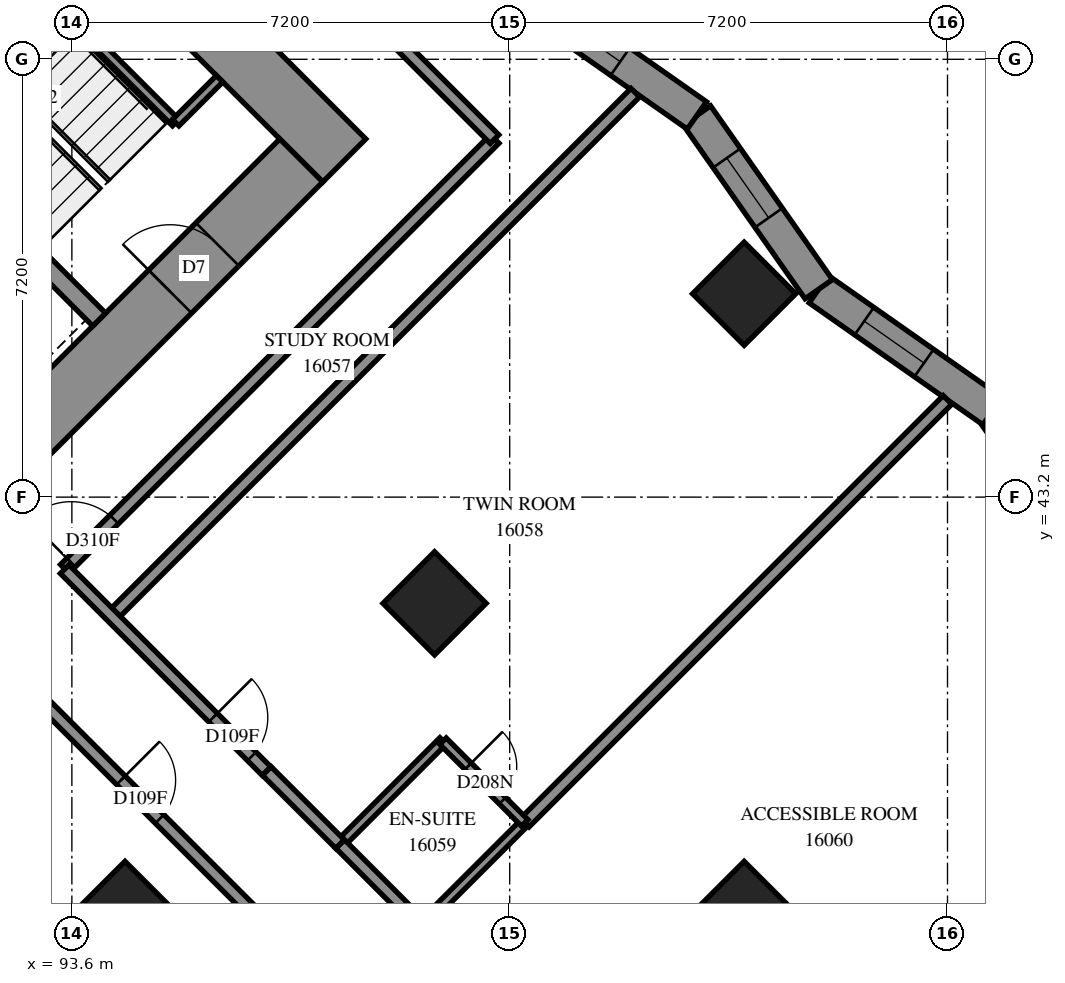
"""IFC4 building model, lengths in metres.
Left out: names, types, materials, properties, quantities, classifications, styles, units other than length and angle.
Written with IfcOpenShell. Run it as: python <this file> out.ifc"""

import sys

from ifc_helpers import new_model, si_unit, direction, frame, frame_2d, origin, origin_2d, place, context, subcontext, project, spatial, polyline, rectangle, outline, extrude, element, fill, save


model = new_model("IFC4")
c1 = context("Model", 3, precision=1e-05, world=origin(), true_north=direction((0.0, 1.0)))
c2 = subcontext(c1, "Body", "Model", "MODEL_VIEW")
j1 = project(units=[si_unit("LENGTHUNIT", "METRE"), si_unit("PLANEANGLEUNIT", "RADIAN")], contexts=[c1])
p1 = place(None, origin())
s1 = spatial("IfcSite", under=j1, at=p1, CompositionType="ELEMENT")
p2 = place(p1, origin())
s2 = spatial("IfcBuilding", under=s1, at=p2, CompositionType="ELEMENT")
p3 = place(p2, frame((0.0, 0.0, 61.0)))
s3 = spatial("IfcBuildingStorey", under=s2, at=p3, CompositionType="ELEMENT", Elevation=61.0)
for number, where, z_axis, x_axis in (
    (1, (104.656, 46.544, 0.0), (0.0, 0.0, 1.0), (0.707, -0.707, 0.0)),
    (2, (99.565, 41.453, 0.0), (0.0, 0.0, 1.0), (0.707, -0.707, 0.0)),
    (3, (94.474, 36.362, 0.0), (0.0, 0.0, 1.0), (0.707, -0.707, 0.0)),
    (4, (104.656, 36.362, 0.0), (0.0, 0.0, 1.0), (0.707, -0.707, 0.0)),
):
    element("IfcColumn", number, at=place(p3, frame(where, z_axis=z_axis, x_axis=x_axis)), inside=s3, PredefinedType="COLUMN", context=c2, shape_type="SweptSolid", body=[
        extrude(rectangle(XDim=1.2, YDim=1.2, at=origin_2d()), origin(), (0.0, 0.0, 1.0), 3.1),
    ])
p4 = place(p3, frame((86.483, 60.333, -0.3), z_axis=(0.0, 0.0, 1.0), x_axis=(0.70710983, -0.7071037324, 0.0)))
e5 = element("IfcWall", 5, at=p4, inside=s3, PredefinedType="SHEAR", context=c2, shape_type="SweptSolid", body=[
    extrude(rectangle(XDim=16.4, YDim=1.0, at=frame_2d((8.2, 0.0))), origin(), (0.0, 0.0, 1.0), 2.7),
])
p5 = place(p4, frame((11.0, 0.0, 0.3)))
e6 = element("IfcOpeningElement", 6, at=p5, cuts=e5, PredefinedType="OPENING", context=c2, shape_type="SweptSolid", body=[
    extrude(rectangle(XDim=0.8, YDim=2.1, at=frame_2d((0.4, 1.05))), frame((0.0, 0.51, 0.0), z_axis=(0.0, -1.0, 0.0), x_axis=(1.0, 0.0, 0.0)), (0.0, 0.0, 1.0), 1.02),
])
p6 = place(p3, frame((87.19, 38.554, -0.3), z_axis=(0.0, 0.0, 1.0), x_axis=(0.707103309, 0.7071102534, 0.0)))
e7 = element("IfcWall", 7, at=p6, inside=s3, PredefinedType="SHEAR", context=c2, shape_type="SweptSolid", body=[
    extrude(rectangle(XDim=14.4, YDim=1.0, at=frame_2d((7.2, 0.0))), origin(), (0.0, 0.0, 1.0), 2.7),
])
p7 = place(p6, frame((4.55, 0.0, 0.3)))
e8 = element("IfcOpeningElement", 8, at=p7, cuts=e7, PredefinedType="OPENING", context=c2, shape_type="SweptSolid", body=[
    extrude(rectangle(XDim=1.1, YDim=2.1, at=frame_2d((0.55, 1.05))), frame((0.0, 0.51, 0.0), z_axis=(0.0, -1.0, 0.0), x_axis=(1.0, 0.0, 0.0)), (0.0, 0.0, 1.0), 1.02),
])
p8 = place(p6, frame((11.35, 0.0, 0.3)))
e9 = element("IfcOpeningElement", 9, at=p8, cuts=e7, PredefinedType="OPENING", context=c2, shape_type="SweptSolid", body=[
    extrude(rectangle(XDim=1.1, YDim=2.1, at=frame_2d((0.55, 1.05))), frame((0.0, 0.51, 0.0), z_axis=(0.0, -1.0, 0.0), x_axis=(1.0, 0.0, 0.0)), (0.0, 0.0, 1.0), 1.02),
])
p9 = place(p3, frame((88.958, 51.211, 0.0), z_axis=(0.0, 0.0, 1.0), x_axis=(0.7070998367, -0.7071137256, 0.0)))
e10 = element("IfcWall", 10, at=p9, inside=s3, PredefinedType="SOLIDWALL", context=c2, shape_type="SweptSolid", body=[
    extrude(rectangle(XDim=7.2, YDim=0.3, at=frame_2d((3.6, 0.0))), origin(), (0.0, 0.0, 1.0), 3.1),
])
p10 = place(p3, frame((110.743, 41.759, 0.0), z_axis=(0.0, 0.0, 1.0), x_axis=(-0.5742832552, 0.8186566697, 0.0)))
e11 = element("IfcWall", 11, at=p10, inside=s3, PredefinedType="SOLIDWALL", context=c2, shape_type="SweptSolid", body=[
    extrude(outline(polyline([(0.048, -0.275), (3.538, -0.275), (3.442, 0.275), (-0.048, 0.275), (0.048, -0.275)])), origin(), (0.0, 0.0, 1.0), 3.1),
])
p11 = place(p10, frame((1.269, 0.0, 0.5)))
e12 = element("IfcOpeningElement", 12, at=p11, cuts=e11, PredefinedType="OPENING", context=c2, shape_type="SweptSolid", body=[
    extrude(rectangle(XDim=1.2, YDim=2.45, at=frame_2d((0.6, 1.225))), frame((0.0, 0.285, 0.0), z_axis=(0.0, -1.0, 0.0), x_axis=(1.0, 0.0, 0.0)), (0.0, 0.0, 1.0), 0.57),
])
p12 = place(p3, frame((108.739, 44.616, 0.0), z_axis=(0.0, 0.0, 1.0), x_axis=(-0.8186701418, 0.5742640499, 0.0)))
e13 = element("IfcWall", 13, at=p12, inside=s3, PredefinedType="SOLIDWALL", context=c2, shape_type="SweptSolid", body=[
    extrude(outline(polyline([(-0.048, -0.275), (3.442, -0.275), (3.538, 0.275), (0.048, 0.275), (-0.048, -0.275)])), origin(), (0.0, 0.0, 1.0), 3.1),
])
p13 = place(p12, frame((1.375, 0.0, 0.5)))
e14 = element("IfcOpeningElement", 14, at=p13, cuts=e13, PredefinedType="OPENING", context=c2, shape_type="SweptSolid", body=[
    extrude(rectangle(XDim=1.2, YDim=2.45, at=frame_2d((0.6, 1.225))), frame((0.0, 0.285, 0.0), z_axis=(0.0, -1.0, 0.0), x_axis=(1.0, 0.0, 0.0)), (0.0, 0.0, 1.0), 0.57),
])
p14 = place(p3, frame((105.882, 46.62, 0.0), z_axis=(0.0, 0.0, 1.0), x_axis=(-0.5742832552, 0.8186566697, 0.0)))
e15 = element("IfcWall", 15, at=p14, inside=s3, PredefinedType="SOLIDWALL", context=c2, shape_type="SweptSolid", body=[
    extrude(outline(polyline([(0.048, -0.275), (3.538, -0.275), (3.442, 0.275), (-0.048, 0.275), (0.048, -0.275)])), origin(), (0.0, 0.0, 1.0), 3.1),
])
p15 = place(p14, frame((1.434, 0.0, 0.5)))
e16 = element("IfcOpeningElement", 16, at=p15, cuts=e15, PredefinedType="OPENING", context=c2, shape_type="SweptSolid", body=[
    extrude(rectangle(XDim=1.2, YDim=2.45, at=frame_2d((0.6, 1.225))), frame((0.0, 0.285, 0.0), z_axis=(0.0, -1.0, 0.0), x_axis=(1.0, 0.0, 0.0)), (0.0, 0.0, 1.0), 0.57),
])
p16 = place(p3, frame((103.878, 49.477, 0.0), z_axis=(0.0, 0.0, 1.0), x_axis=(-0.8186472188, 0.5742967275, 0.0)))
e17 = element("IfcWall", 17, at=p16, inside=s3, PredefinedType="SOLIDWALL", context=c2, shape_type="SweptSolid", body=[
    extrude(outline(polyline([(-0.048, -0.275), (3.442, -0.275), (3.538, 0.275), (0.048, 0.275), (-0.048, -0.275)])), origin(), (0.0, 0.0, 1.0), 3.1),
])
p17 = place(p16, frame((1.541, 0.0, 0.5)))
e18 = element("IfcOpeningElement", 18, at=p17, cuts=e17, PredefinedType="OPENING", context=c2, shape_type="SweptSolid", body=[
    extrude(rectangle(XDim=1.2, YDim=2.45, at=frame_2d((0.6, 1.225))), frame((0.0, 0.285, 0.0), z_axis=(0.0, -1.0, 0.0), x_axis=(1.0, 0.0, 0.0)), (0.0, 0.0, 1.0), 0.57),
])
p18 = place(p3, frame((91.313, 53.354, 0.0), z_axis=(0.0, 0.0, 1.0), x_axis=(0.7071067812, -0.7071067812, 0.0)))
e19 = element("IfcWall", 19, at=p18, inside=s3, PredefinedType="PARTITIONING", context=c2, shape_type="SweptSolid", body=[
    extrude(rectangle(XDim=5.65, YDim=0.15, at=frame_2d((2.825, 0.0))), origin(), (0.0, 0.0, 1.0), 3.1),
])
p19 = place(p3, frame((95.308, 49.358, 0.0), z_axis=(0.0, 0.0, 1.0), x_axis=(0.70705776, 0.707155799, 0.0)))
e20 = element("IfcWall", 20, at=p19, inside=s3, PredefinedType="PARTITIONING", context=c2, shape_type="SweptSolid", body=[
    extrude(rectangle(XDim=1.02, YDim=0.15, at=frame_2d((0.51, 0.0))), origin(), (0.0, 0.0, 1.0), 3.1),
])
p20 = place(p3, frame((94.259, 41.243, 0.0), z_axis=(0.0, 0.0, 1.0), x_axis=(0.7070205168, 0.707193035, 0.0)))
e21 = element("IfcWall", 21, at=p20, inside=s3, PredefinedType="PARTITIONING", context=c2, shape_type="SweptSolid", body=[
    extrude(rectangle(XDim=12.173, YDim=0.2, at=frame_2d((6.086, 0.0))), origin(), (0.0, 0.0, 1.0), 3.1),
])
p21 = place(p3, frame((93.484, 42.02, 0.0), z_axis=(0.0, 0.0, 1.0), x_axis=(0.7071067812, 0.7071067812, 0.0)))
e22 = element("IfcWall", 22, at=p21, inside=s3, PredefinedType="PARTITIONING", context=c2, shape_type="SweptSolid", body=[
    extrude(rectangle(XDim=9.998, YDim=0.2, at=frame_2d((4.999, 0.0))), origin(), (0.0, 0.0, 1.0), 3.1),
])
p22 = place(p21, frame((0.148, 0.0, 0.0)))
e23 = element("IfcOpeningElement", 23, at=p22, cuts=e22, PredefinedType="OPENING", context=c2, shape_type="SweptSolid", body=[
    extrude(rectangle(XDim=1.0, YDim=2.1, at=frame_2d((0.5, 1.05))), frame((0.0, 0.11, 0.0), z_axis=(0.0, -1.0, 0.0), x_axis=(1.0, 0.0, 0.0)), (0.0, 0.0, 1.0), 0.22),
])
p23 = place(p3, frame((106.14, 32.756, 0.0), z_axis=(0.0, 0.0, 1.0), x_axis=(0.7071017243, 0.707111838, 0.0)))
e24 = element("IfcWall", 24, at=p23, inside=s3, PredefinedType="PARTITIONING", context=c2, shape_type="SweptSolid", body=[
    extrude(rectangle(XDim=9.887, YDim=0.2, at=frame_2d((4.944, 0.0))), origin(), (0.0, 0.0, 1.0), 3.1),
])
p24 = place(p3, frame((101.049, 37.847, 0.0), z_axis=(0.0, 0.0, 1.0), x_axis=(0.7071067812, 0.7071067812, 0.0)))
e25 = element("IfcWall", 25, at=p24, inside=s3, PredefinedType="PARTITIONING", context=c2, shape_type="SweptSolid", body=[
    extrude(rectangle(XDim=9.831, YDim=0.2, at=frame_2d((4.915, 0.0))), origin(), (0.0, 0.0, 1.0), 3.1),
])
p25 = place(p3, frame((92.349, 40.601, 0.0), z_axis=(0.0, 0.0, 1.0), x_axis=(0.7071067812, -0.7071067812, 0.0)))
e26 = element("IfcWall", 26, at=p25, inside=s3, PredefinedType="PARTITIONING", context=c2, shape_type="SweptSolid", body=[
    extrude(rectangle(XDim=8.101, YDim=0.2, at=frame_2d((4.05, 0.0))), origin(), (0.0, 0.0, 1.0), 3.1),
])
p26 = place(p25, frame((2.909, 0.0, 0.0)))
e27 = element("IfcOpeningElement", 27, at=p26, cuts=e26, PredefinedType="OPENING", context=c2, shape_type="SweptSolid", body=[
    extrude(rectangle(XDim=0.9, YDim=2.1, at=frame_2d((0.45, 1.05))), frame((0.0, 0.11, 0.0), z_axis=(0.0, -1.0, 0.0), x_axis=(1.0, 0.0, 0.0)), (0.0, 0.0, 1.0), 0.22),
])
p27 = place(p3, frame((93.481, 42.015, 0.0), z_axis=(0.0, 0.0, 1.0), x_axis=(0.7071067812, -0.7071067812, 0.0)))
e28 = element("IfcWall", 28, at=p27, inside=s3, PredefinedType="PARTITIONING", context=c2, shape_type="SweptSolid", body=[
    extrude(rectangle(XDim=4.698, YDim=0.2, at=frame_2d((2.349, 0.0))), origin(), (0.0, 0.0, 1.0), 3.1),
])
p28 = place(p27, frame((3.452, 0.0, 0.0)))
e29 = element("IfcOpeningElement", 29, at=p28, cuts=e28, PredefinedType="OPENING", context=c2, shape_type="SweptSolid", body=[
    extrude(rectangle(XDim=0.9, YDim=2.1, at=frame_2d((0.45, 1.05))), frame((0.0, 0.11, 0.0), z_axis=(0.0, -1.0, 0.0), x_axis=(1.0, 0.0, 0.0)), (0.0, 0.0, 1.0), 0.22),
])
p29 = place(p3, frame((98.783, 50.855, 0.0), z_axis=(0.0, 0.0, 1.0), x_axis=(0.7071067812, -0.7071067812, 0.0)))
e30 = element("IfcWall", 30, at=p29, inside=s3, PredefinedType="PARTITIONING", context=c2, shape_type="SweptSolid", body=[
    extrude(rectangle(XDim=2.5, YDim=0.2, at=frame_2d((1.25, 0.0))), origin(), (0.0, 0.0, 1.0), 3.1),
])
p30 = place(p3, frame((99.349, 36.153, 0.0), z_axis=(0.0, 0.0, 1.0), x_axis=(0.7075233388, 0.706689978, 0.0)))
e31 = element("IfcWall", 31, at=p30, inside=s3, PredefinedType="PARTITIONING", context=c2, shape_type="SweptSolid", body=[
    extrude(rectangle(XDim=2.4, YDim=0.15, at=frame_2d((1.2, 0.0))), origin(), (0.0, 0.0, 1.0), 3.1),
])
p31 = place(p3, frame((98.009, 37.495, 0.0), z_axis=(0.0, 0.0, 1.0), x_axis=(0.7071067812, 0.7071067812, 0.0)))
e32 = element("IfcWall", 32, at=p31, inside=s3, PredefinedType="PARTITIONING", context=c2, shape_type="SweptSolid", body=[
    extrude(rectangle(XDim=2.398, YDim=0.15, at=frame_2d((1.199, 0.0))), origin(), (0.0, 0.0, 1.0), 3.1),
])
p32 = place(p3, frame((99.703, 39.187, 0.0), z_axis=(0.0, 0.0, 1.0), x_axis=(0.7071067812, -0.7071067812, 0.0)))
e33 = element("IfcWall", 33, at=p32, inside=s3, PredefinedType="PARTITIONING", context=c2, shape_type="SweptSolid", body=[
    extrude(rectangle(XDim=1.901, YDim=0.15, at=frame_2d((0.95, 0.0))), origin(), (0.0, 0.0, 1.0), 3.1),
])
p33 = place(p32, frame((0.584, 0.0, 0.0)))
e34 = element("IfcOpeningElement", 34, at=p33, cuts=e33, PredefinedType="OPENING", context=c2, shape_type="SweptSolid", body=[
    extrude(rectangle(XDim=0.8, YDim=2.1, at=frame_2d((0.4, 1.05))), frame((0.0, 0.085, 0.0), z_axis=(0.0, -1.0, 0.0), x_axis=(1.0, 0.0, 0.0)), (0.0, 0.0, 1.0), 0.17),
])
p34 = place(p3, frame((98.012, 37.496, 0.0), z_axis=(0.0, 0.0, 1.0), x_axis=(0.7065800724, -0.7076330979, 0.0)))
e35 = element("IfcWall", 35, at=p34, inside=s3, PredefinedType="PARTITIONING", context=c2, shape_type="SweptSolid", body=[
    extrude(rectangle(XDim=1.899, YDim=0.2, at=frame_2d((0.95, 0.0))), origin(), (0.0, 0.0, 1.0), 3.1),
])
p35 = place(p3, frame((96.806, 38.696, 0.0), z_axis=(0.0, 0.0, 1.0), x_axis=(0.7076943229, -0.7065187509, 0.0)))
e36 = element("IfcWall", 36, at=p35, inside=s3, PredefinedType="PARTITIONING", context=c2, shape_type="SweptSolid", body=[
    extrude(rectangle(XDim=1.701, YDim=0.2, at=frame_2d((0.851, 0.0))), origin(), (0.0, 0.0, 1.0), 3.1),
])
p36 = place(p13, origin())
e37 = element("IfcWindow", 37, at=p36, inside=s3, PartitioningType="SINGLE_PANEL", PredefinedType="WINDOW", context=c2, shape_type="SweptSolid", body=[
    extrude(rectangle(XDim=1.2, YDim=2.45, at=frame_2d((0.6, 1.225))), frame((0.0, 0.155, 0.0), z_axis=(0.0, -1.0, 0.0), x_axis=(1.0, 0.0, 0.0)), (0.0, 0.0, 1.0), 0.06),
])
fill(e14, e37)
p37 = place(p15, origin())
e38 = element("IfcWindow", 38, at=p37, inside=s3, PartitioningType="SINGLE_PANEL", PredefinedType="WINDOW", context=c2, shape_type="SweptSolid", body=[
    extrude(rectangle(XDim=1.2, YDim=2.45, at=frame_2d((0.6, 1.225))), frame((0.0, 0.155, 0.0), z_axis=(0.0, -1.0, 0.0), x_axis=(1.0, 0.0, 0.0)), (0.0, 0.0, 1.0), 0.06),
])
fill(e16, e38)
p38 = place(p17, origin())
e39 = element("IfcWindow", 39, at=p38, inside=s3, PartitioningType="SINGLE_PANEL", PredefinedType="WINDOW", context=c2, shape_type="SweptSolid", body=[
    extrude(rectangle(XDim=1.2, YDim=2.45, at=frame_2d((0.6, 1.225))), frame((0.0, 0.155, 0.0), z_axis=(0.0, -1.0, 0.0), x_axis=(1.0, 0.0, 0.0)), (0.0, 0.0, 1.0), 0.06),
])
fill(e18, e39)
p39 = place(p8, origin())
e40 = element("IfcDoor", 40, at=p39, inside=s3, OperationType="SINGLE_SWING_RIGHT", PredefinedType="DOOR", context=c2, shape_type="SweptSolid", body=[
    extrude(rectangle(XDim=1.1, YDim=2.1, at=frame_2d((0.55, 1.05))), frame((0.0, 0.025, 0.0), z_axis=(0.0, -1.0, 0.0), x_axis=(1.0, 0.0, 0.0)), (0.0, 0.0, 1.0), 0.05),
])
fill(e9, e40)
p40 = place(p22, origin())
e41 = element("IfcDoor", 41, at=p40, inside=s3, OperationType="SINGLE_SWING_LEFT", PredefinedType="DOOR", context=c2, shape_type="SweptSolid", body=[
    extrude(rectangle(XDim=1.0, YDim=2.1, at=frame_2d((0.5, 1.05))), frame((0.0, 0.025, 0.0), z_axis=(0.0, -1.0, 0.0), x_axis=(1.0, 0.0, 0.0)), (0.0, 0.0, 1.0), 0.05),
])
fill(e23, e41)
p41 = place(p28, origin())
e42 = element("IfcDoor", 42, at=p41, inside=s3, OperationType="SINGLE_SWING_RIGHT", PredefinedType="DOOR", context=c2, shape_type="SweptSolid", body=[
    extrude(rectangle(XDim=0.9, YDim=2.1, at=frame_2d((0.45, 1.05))), frame((0.0, 0.025, 0.0), z_axis=(0.0, -1.0, 0.0), x_axis=(1.0, 0.0, 0.0)), (0.0, 0.0, 1.0), 0.05),
])
fill(e29, e42)
p42 = place(p33, origin())
e43 = element("IfcDoor", 43, at=p42, inside=s3, OperationType="SINGLE_SWING_RIGHT", PredefinedType="DOOR", context=c2, shape_type="SweptSolid", body=[
    extrude(rectangle(XDim=0.8, YDim=2.1, at=frame_2d((0.4, 1.05))), frame((0.0, 0.025, 0.0), z_axis=(0.0, -1.0, 0.0), x_axis=(1.0, 0.0, 0.0)), (0.0, 0.0, 1.0), 0.05),
])
fill(e34, e43)
p43 = place(p26, origin())
e44 = element("IfcDoor", 44, at=p43, inside=s3, OperationType="SINGLE_SWING_LEFT", PredefinedType="DOOR", context=c2, shape_type="SweptSolid", body=[
    extrude(rectangle(XDim=0.9, YDim=2.1, at=frame_2d((0.45, 1.05))), frame((0.0, 0.025, 0.0), z_axis=(0.0, -1.0, 0.0), x_axis=(1.0, 0.0, 0.0)), (0.0, 0.0, 1.0), 0.05),
])
fill(e27, e44)
save(model, sys.argv[1])
